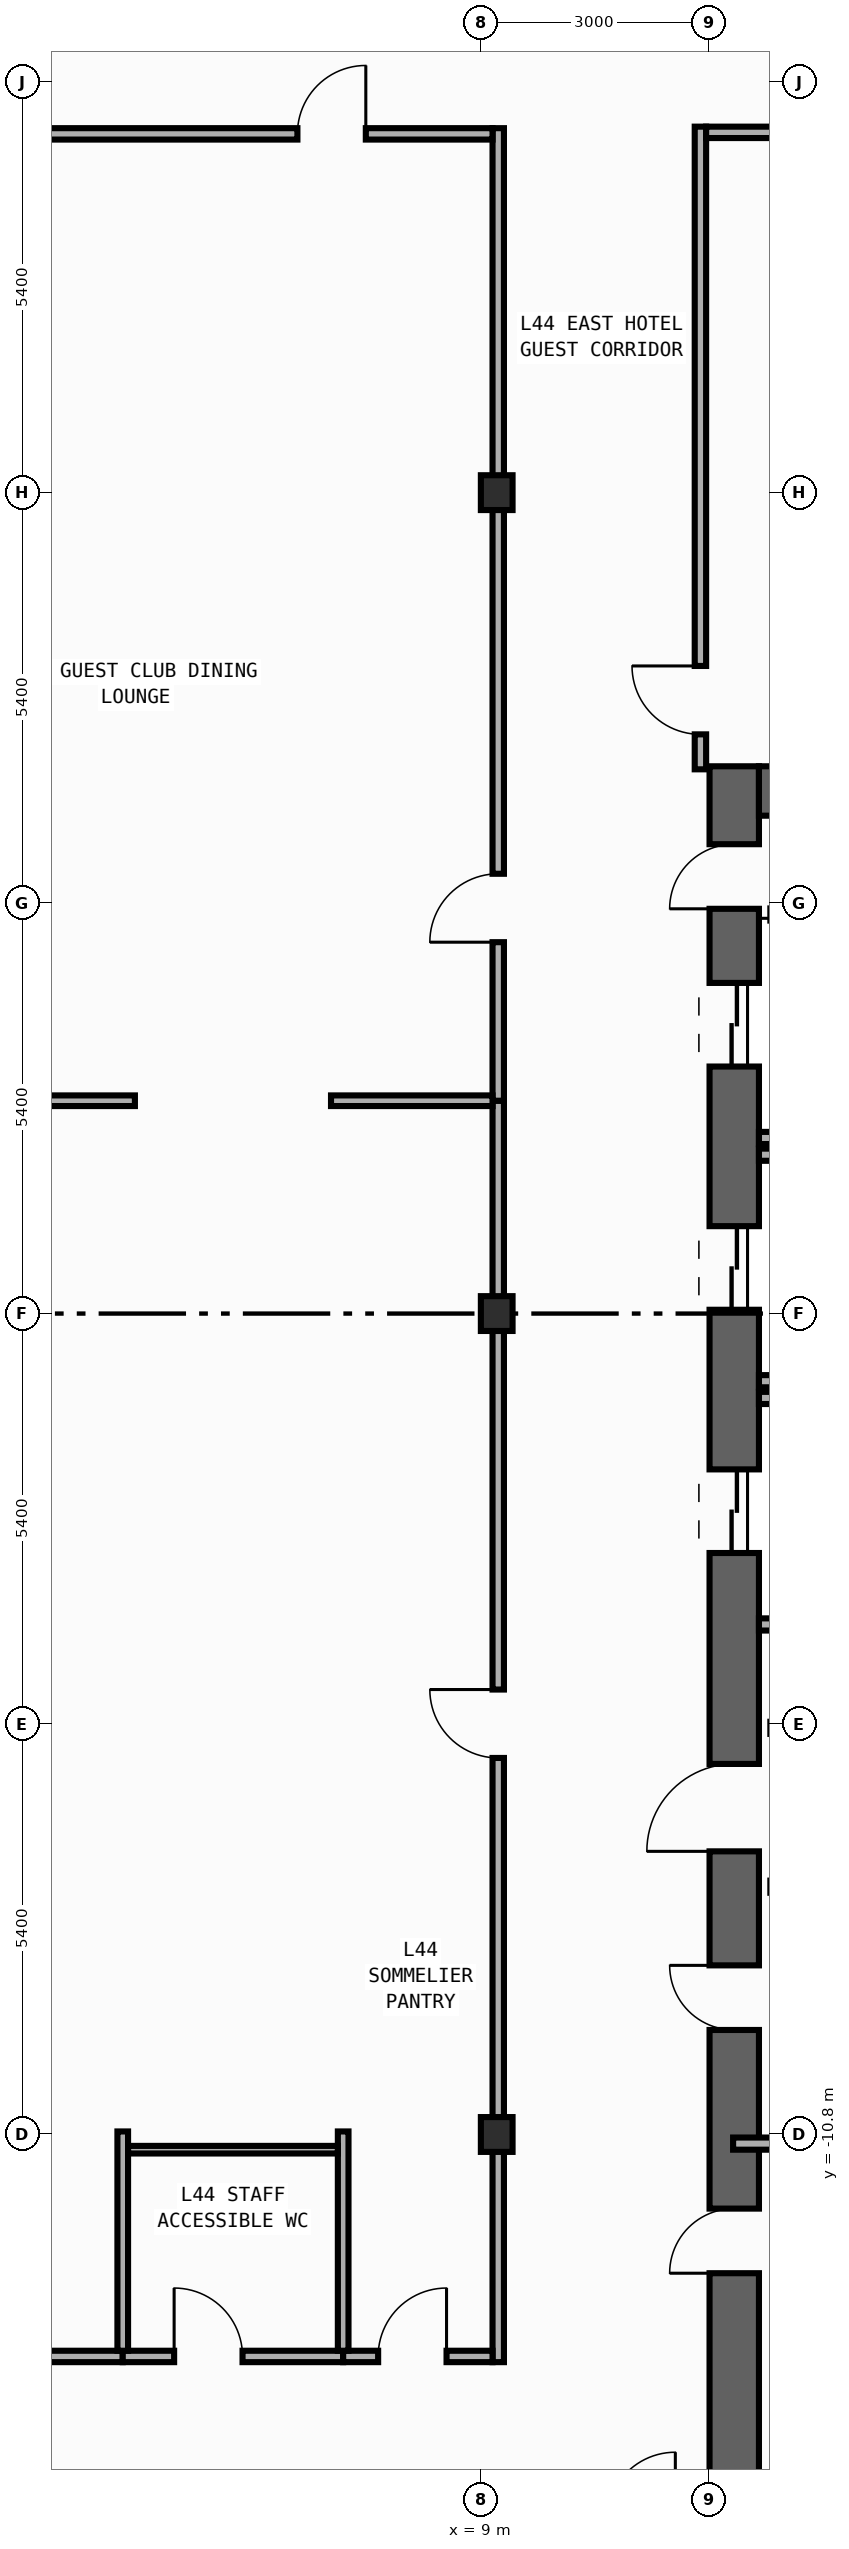
"""IFC4 building model, lengths in metres.
Left out: names, types, materials, properties, quantities, classifications, styles, units other than length and angle.
Written with IfcOpenShell. Run it as: python <this file> out.ifc"""

import sys

from ifc_helpers import new_model, si_unit, direction, frame, frame_2d, origin, origin_2d, place, context, subcontext, project, spatial, rectangle, i_section, extrude, element, fill, save


model = new_model("IFC4")
c1 = context("Model", 3, precision=1e-05, world=origin(), true_north=direction((0.0, 1.0)))
c2 = subcontext(c1, "Body", "Model", "MODEL_VIEW")
j1 = project(units=[si_unit("LENGTHUNIT", "METRE"), si_unit("PLANEANGLEUNIT", "RADIAN")], contexts=[c1])
p1 = place(None, origin())
s1 = spatial("IfcSite", under=j1, at=p1, CompositionType="ELEMENT")
p2 = place(p1, origin())
s2 = spatial("IfcBuilding", under=s1, at=p2, CompositionType="ELEMENT")
p3 = place(p2, frame((0.0, 0.0, 191.6)))
s3 = spatial("IfcBuildingStorey", under=s2, at=p3, CompositionType="ELEMENT", Elevation=191.6)
p4 = place(p3, frame((12.325, -19.8, 0.0), z_axis=(0.0, 0.0, 1.0), x_axis=(0.0, 1.0, 0.0)))
e1 = element("IfcWall", 1, at=p4, inside=s3, PredefinedType="SHEAR", context=c2, shape_type="SweptSolid", body=[
    extrude(rectangle(XDim=27.0, YDim=0.65, at=frame_2d((13.5, 0.0))), origin(), (0.0, 0.0, 1.0), 3.54),
])
p5 = place(p4, frame((23.05, 0.0, 0.0)))
e2 = element("IfcOpeningElement", 2, at=p5, cuts=e1, PredefinedType="OPENING", context=c2, shape_type="SweptSolid", body=[
    extrude(rectangle(XDim=1.1, YDim=2.2, at=frame_2d((0.55, 1.1))), frame((0.0, 0.335, 0.0), z_axis=(0.0, -1.0, 0.0), x_axis=(1.0, 0.0, 0.0)), (0.0, 0.0, 1.0), 0.67),
])
p6 = place(p4, frame((19.85, 0.0, 0.0)))
e3 = element("IfcOpeningElement", 3, at=p6, cuts=e1, PredefinedType="OPENING", context=c2, shape_type="SweptSolid", body=[
    extrude(rectangle(XDim=1.1, YDim=2.2, at=frame_2d((0.55, 1.1))), frame((0.0, 0.335, 0.0), z_axis=(0.0, -1.0, 0.0), x_axis=(1.0, 0.0, 0.0)), (0.0, 0.0, 1.0), 0.67),
])
p7 = place(p4, frame((16.65, 0.0, 0.0)))
e4 = element("IfcOpeningElement", 4, at=p7, cuts=e1, PredefinedType="OPENING", context=c2, shape_type="SweptSolid", body=[
    extrude(rectangle(XDim=1.1, YDim=2.2, at=frame_2d((0.55, 1.1))), frame((0.0, 0.335, 0.0), z_axis=(0.0, -1.0, 0.0), x_axis=(1.0, 0.0, 0.0)), (0.0, 0.0, 1.0), 0.67),
])
p8 = place(p4, frame((7.175, 0.0, 0.0)))
e5 = element("IfcOpeningElement", 5, at=p8, cuts=e1, PredefinedType="OPENING", context=c2, shape_type="SweptSolid", body=[
    extrude(rectangle(XDim=0.85, YDim=2.1, at=frame_2d((0.425, 1.05))), frame((0.0, 0.335, 0.0), z_axis=(0.0, -1.0, 0.0), x_axis=(1.0, 0.0, 0.0)), (0.0, 0.0, 1.0), 0.67),
])
p9 = place(p4, frame((10.375, 0.0, 0.0)))
e6 = element("IfcOpeningElement", 6, at=p9, cuts=e1, PredefinedType="OPENING", context=c2, shape_type="SweptSolid", body=[
    extrude(rectangle(XDim=0.85, YDim=2.1, at=frame_2d((0.425, 1.05))), frame((0.0, 0.335, 0.0), z_axis=(0.0, -1.0, 0.0), x_axis=(1.0, 0.0, 0.0)), (0.0, 0.0, 1.0), 0.67),
])
p10 = place(p4, frame((12.725, 0.0, 0.0)))
e7 = element("IfcOpeningElement", 7, at=p10, cuts=e1, PredefinedType="OPENING", context=c2, shape_type="SweptSolid", body=[
    extrude(rectangle(XDim=1.15, YDim=2.2, at=frame_2d((0.575, 1.1))), frame((0.0, 0.335, 0.0), z_axis=(0.0, -1.0, 0.0), x_axis=(1.0, 0.0, 0.0)), (0.0, 0.0, 1.0), 0.67),
])
p11 = place(p4, frame((25.125, 0.0, 0.0)))
e8 = element("IfcOpeningElement", 8, at=p11, cuts=e1, PredefinedType="OPENING", context=c2, shape_type="SweptSolid", body=[
    extrude(rectangle(XDim=0.85, YDim=2.1, at=frame_2d((0.425, 1.05))), frame((0.0, 0.335, 0.0), z_axis=(0.0, -1.0, 0.0), x_axis=(1.0, 0.0, 0.0)), (0.0, 0.0, 1.0), 0.67),
])
p12 = place(p3, frame((12.65, 6.875, 0.0), z_axis=(0.0, 0.0, 1.0), x_axis=(1.0, 0.0, 0.0)))
e9 = element("IfcWall", 9, at=p12, inside=s3, PredefinedType="SHEAR", context=c2, shape_type="SweptSolid", body=[
    extrude(rectangle(XDim=7.1, YDim=0.65, at=frame_2d((3.55, 0.0))), origin(), (0.0, 0.0, 1.0), 3.54),
])
for number, where, z_axis, x_axis in (
    (10, (9.2, -10.8, 0.0), (0.0, 0.0, 1.0), (1.0, 0.0, 0.0)),
    (11, (9.2, 0.0, 0.0), (0.0, 0.0, 1.0), (1.0, 0.0, 0.0)),
    (12, (9.2, 10.8, 0.0), (0.0, 0.0, 1.0), (1.0, 0.0, 0.0)),
):
    element("IfcColumn", number, at=place(p3, frame(where, z_axis=z_axis, x_axis=x_axis)), inside=s3, PredefinedType="COLUMN", context=c2, shape_type="SweptSolid", body=[
        extrude(i_section(OverallWidth=0.417, OverallDepth=0.458, WebThickness=0.03, FlangeThickness=0.05, FilletRadius=0.022, at=origin_2d()), origin(), (0.0, 0.0, 1.0), 3.8),
    ])
for number, where, z_axis, x_axis in (
    (13, (12.65, 2.31, 0.0), (0.0, 0.0, 1.0), (1.0, 0.0, 0.0)),
    (14, (12.65, -0.89, 0.0), (0.0, 0.0, 1.0), (1.0, 0.0, 0.0)),
    (15, (12.65, 2.09, 0.0), (0.0, 0.0, 1.0), (1.0, 0.0, 0.0)),
    (16, (12.65, -4.09, 0.0), (0.0, 0.0, 1.0), (1.0, 0.0, 0.0)),
    (17, (12.65, -1.11, 0.0), (0.0, 0.0, 1.0), (1.0, 0.0, 0.0)),
):
    element("IfcWall", number, at=place(p3, frame(where, z_axis=z_axis, x_axis=x_axis)), inside=s3, PredefinedType="STANDARD", context=c2, shape_type="SweptSolid", body=[
        extrude(rectangle(XDim=2.34, YDim=0.16, at=frame_2d((1.17, 0.0))), origin(), (0.0, 0.0, 1.0), 3.54),
    ])
for number, where, z_axis, x_axis in (
    (18, (12.8, -5.45, 0.0), (0.0, 0.0, 1.0), (1.0, 0.0, 0.0)),
    (19, (12.8, -7.54, 0.0), (0.0, 0.0, 1.0), (1.0, 0.0, 0.0)),
    (20, (12.8, 5.25, 0.0), (0.0, 0.0, 1.0), (1.0, 0.0, 0.0)),
):
    element("IfcWall", number, at=place(p3, frame(where, z_axis=z_axis, x_axis=x_axis)), inside=s3, PredefinedType="STANDARD", context=c2, shape_type="SweptSolid", body=[
        extrude(rectangle(XDim=2.6, YDim=0.16, at=frame_2d((1.3, 0.0))), origin(), (0.0, 0.0, 1.0), 3.54),
    ])
p13 = place(p3, frame((12.31, -10.92, 0.0), z_axis=(0.0, 0.0, 1.0), x_axis=(1.0, 0.0, 0.0)))
e21 = element("IfcWall", 21, at=p13, inside=s3, PredefinedType="PARTITIONING", context=c2, shape_type="SweptSolid", body=[
    extrude(rectangle(XDim=3.065, YDim=0.16, at=frame_2d((1.532, 0.0))), origin(), (0.0, 0.0, 1.0), 2.952),
])
p14 = place(p3, frame((9.22, -13.795, 0.0), z_axis=(0.0, 0.0, 1.0), x_axis=(0.0, 1.0, 0.0)))
e22 = element("IfcWall", 22, at=p14, inside=s3, PredefinedType="PARTITIONING", context=c2, shape_type="SweptSolid", body=[
    extrude(rectangle(XDim=16.595, YDim=0.15, at=frame_2d((8.297, 0.0))), origin(), (0.0, 0.0, 1.0), 2.952),
])
p15 = place(p14, frame((7.949, 0.0, 0.0)))
e23 = element("IfcOpeningElement", 23, at=p15, cuts=e22, PredefinedType="OPENING", context=c2, shape_type="SweptSolid", body=[
    extrude(rectangle(XDim=0.9, YDim=2.15, at=frame_2d((0.45, 1.075))), frame((0.0, 0.085, 0.0), z_axis=(0.0, -1.0, 0.0), x_axis=(1.0, 0.0, 0.0)), (0.0, 0.0, 1.0), 0.17),
])
p16 = place(p3, frame((9.22, 2.8, 0.0), z_axis=(0.0, 0.0, 1.0), x_axis=(0.0, 1.0, 0.0)))
e24 = element("IfcWall", 24, at=p16, inside=s3, PredefinedType="PARTITIONING", context=c2, shape_type="SweptSolid", body=[
    extrude(rectangle(XDim=12.795, YDim=0.15, at=frame_2d((6.397, 0.0))), origin(), (0.0, 0.0, 1.0), 2.952),
])
p17 = place(p16, frame((2.086, 0.0, 0.0)))
e25 = element("IfcOpeningElement", 25, at=p17, cuts=e24, PredefinedType="OPENING", context=c2, shape_type="SweptSolid", body=[
    extrude(rectangle(XDim=0.9, YDim=2.15, at=frame_2d((0.45, 1.075))), frame((0.0, 0.085, 0.0), z_axis=(0.0, -1.0, 0.0), x_axis=(1.0, 0.0, 0.0)), (0.0, 0.0, 1.0), 0.17),
])
p18 = place(p3, frame((11.88, 7.16, 0.0), z_axis=(0.0, 0.0, 1.0), x_axis=(0.0, 1.0, 0.0)))
e26 = element("IfcWall", 26, at=p18, inside=s3, PredefinedType="PARTITIONING", context=c2, shape_type="SweptSolid", body=[
    extrude(rectangle(XDim=8.455, YDim=0.15, at=frame_2d((4.228, 0.0))), origin(), (0.0, 0.0, 1.0), 3.54),
])
p19 = place(p18, frame((0.46, 0.0, 0.0)))
e27 = element("IfcOpeningElement", 27, at=p19, cuts=e26, PredefinedType="OPENING", context=c2, shape_type="SweptSolid", body=[
    extrude(rectangle(XDim=0.9, YDim=2.15, at=frame_2d((0.45, 1.075))), frame((0.0, 0.085, 0.0), z_axis=(0.0, -1.0, 0.0), x_axis=(1.0, 0.0, 0.0)), (0.0, 0.0, 1.0), 0.17),
])
p20 = place(p3, frame((-0.32, 15.52, 0.0), z_axis=(0.0, 0.0, 1.0), x_axis=(1.0, 0.0, 0.0)))
e28 = element("IfcWall", 28, at=p20, inside=s3, PredefinedType="PARTITIONING", context=c2, shape_type="SweptSolid", body=[
    extrude(rectangle(XDim=9.465, YDim=0.15, at=frame_2d((4.732, 0.0))), origin(), (0.0, 0.0, 1.0), 3.54),
])
p21 = place(p20, frame((6.898, 0.0, 0.0)))
e29 = element("IfcOpeningElement", 29, at=p21, cuts=e28, PredefinedType="OPENING", context=c2, shape_type="SweptSolid", body=[
    extrude(rectangle(XDim=0.9, YDim=2.15, at=frame_2d((0.45, 1.075))), frame((0.0, 0.085, 0.0), z_axis=(0.0, -1.0, 0.0), x_axis=(1.0, 0.0, 0.0)), (0.0, 0.0, 1.0), 0.17),
])
p22 = place(p3, frame((11.955, 15.54, 0.0), z_axis=(0.0, 0.0, 1.0), x_axis=(1.0, 0.0, 0.0)))
e30 = element("IfcWall", 30, at=p22, inside=s3, PredefinedType="PARTITIONING", context=c2, shape_type="SweptSolid", body=[
    extrude(rectangle(XDim=10.5, YDim=0.15, at=frame_2d((5.25, 0.0))), origin(), (0.0, 0.0, 1.0), 3.54),
])
p23 = place(p22, frame((4.901, 0.0, 0.0)))
e31 = element("IfcOpeningElement", 31, at=p23, cuts=e30, PredefinedType="OPENING", context=c2, shape_type="SweptSolid", body=[
    extrude(rectangle(XDim=0.9, YDim=2.15, at=frame_2d((0.45, 1.075))), frame((0.0, 0.085, 0.0), z_axis=(0.0, -1.0, 0.0), x_axis=(1.0, 0.0, 0.0)), (0.0, 0.0, 1.0), 0.17),
])
p24 = place(p3, frame((-3.32, -13.72, 0.0), z_axis=(0.0, 0.0, 1.0), x_axis=(1.0, 0.0, 0.0)))
e32 = element("IfcWall", 32, at=p24, inside=s3, PredefinedType="PARTITIONING", context=c2, shape_type="SweptSolid", body=[
    extrude(rectangle(XDim=7.6, YDim=0.15, at=frame_2d((3.8, 0.0))), origin(), (0.0, 0.0, 1.0), 3.54),
])
p25 = place(p24, frame((0.667, 0.0, 0.0)))
e33 = element("IfcOpeningElement", 33, at=p25, cuts=e32, PredefinedType="OPENING", context=c2, shape_type="SweptSolid", body=[
    extrude(rectangle(XDim=0.9, YDim=2.15, at=frame_2d((0.45, 1.075))), frame((0.0, 0.085, 0.0), z_axis=(0.0, -1.0, 0.0), x_axis=(1.0, 0.0, 0.0)), (0.0, 0.0, 1.0), 0.17),
])
p26 = place(p3, frame((4.28, -13.72, 0.0), z_axis=(0.0, 0.0, 1.0), x_axis=(1.0, 0.0, 0.0)))
e34 = element("IfcWall", 34, at=p26, inside=s3, PredefinedType="PARTITIONING", context=c2, shape_type="SweptSolid", body=[
    extrude(rectangle(XDim=2.9, YDim=0.15, at=frame_2d((1.45, 0.0))), origin(), (0.0, 0.0, 1.0), 3.54),
])
p27 = place(p26, frame((0.676, 0.0, 0.0)))
e35 = element("IfcOpeningElement", 35, at=p27, cuts=e34, PredefinedType="OPENING", context=c2, shape_type="SweptSolid", body=[
    extrude(rectangle(XDim=0.9, YDim=2.15, at=frame_2d((0.45, 1.075))), frame((0.0, 0.085, 0.0), z_axis=(0.0, -1.0, 0.0), x_axis=(1.0, 0.0, 0.0)), (0.0, 0.0, 1.0), 0.17),
])
p28 = place(p3, frame((7.18, -13.72, 0.0), z_axis=(0.0, 0.0, 1.0), x_axis=(1.0, 0.0, 0.0)))
e36 = element("IfcWall", 36, at=p28, inside=s3, PredefinedType="PARTITIONING", context=c2, shape_type="SweptSolid", body=[
    extrude(rectangle(XDim=1.965, YDim=0.15, at=frame_2d((0.982, 0.0))), origin(), (0.0, 0.0, 1.0), 3.54),
])
p29 = place(p28, frame((0.46, 0.0, 0.0)))
e37 = element("IfcOpeningElement", 37, at=p29, cuts=e36, PredefinedType="OPENING", context=c2, shape_type="SweptSolid", body=[
    extrude(rectangle(XDim=0.9, YDim=2.15, at=frame_2d((0.45, 1.075))), frame((0.0, 0.085, 0.0), z_axis=(0.0, -1.0, 0.0), x_axis=(1.0, 0.0, 0.0)), (0.0, 0.0, 1.0), 0.17),
])
p30 = place(p3, frame((4.28, -13.645, 0.0), z_axis=(0.0, 0.0, 1.0), x_axis=(0.0, 1.0, 0.0)))
e38 = element("IfcWall", 38, at=p30, inside=s3, PredefinedType="PARTITIONING", context=c2, shape_type="SweptSolid", body=[
    extrude(rectangle(XDim=2.885, YDim=0.14, at=frame_2d((1.442, 0.0))), origin(), (0.0, 0.0, 1.0), 3.54),
])
p31 = place(p3, frame((-0.32, 2.8, 0.0), z_axis=(0.0, 0.0, 1.0), x_axis=(1.0, 0.0, 0.0)))
e39 = element("IfcWall", 39, at=p31, inside=s3, PredefinedType="PARTITIONING", context=c2, shape_type="SweptSolid", body=[
    extrude(rectangle(XDim=4.76, YDim=0.14, at=frame_2d((2.38, 0.0))), origin(), (0.0, 0.0, 1.0), 3.54),
])
p32 = place(p3, frame((7.18, -13.645, 0.0), z_axis=(0.0, 0.0, 1.0), x_axis=(0.0, 1.0, 0.0)))
e40 = element("IfcWall", 40, at=p32, inside=s3, PredefinedType="PARTITIONING", context=c2, shape_type="SweptSolid", body=[
    extrude(rectangle(XDim=2.885, YDim=0.14, at=frame_2d((1.442, 0.0))), origin(), (0.0, 0.0, 1.0), 3.54),
])
p33 = place(p3, frame((7.02, 2.8, 0.0), z_axis=(0.0, 0.0, 1.0), x_axis=(1.0, 0.0, 0.0)))
e41 = element("IfcWall", 41, at=p33, inside=s3, PredefinedType="PARTITIONING", context=c2, shape_type="SweptSolid", body=[
    extrude(rectangle(XDim=2.125, YDim=0.14, at=frame_2d((1.062, 0.0))), origin(), (0.0, 0.0, 1.0), 3.54),
])
p34 = place(p3, frame((4.35, -11.0, 0.0), z_axis=(0.0, 0.0, 1.0), x_axis=(1.0, 0.0, 0.0)))
e42 = element("IfcWall", 42, at=p34, inside=s3, PredefinedType="PARTITIONING", context=c2, shape_type="SweptSolid", body=[
    extrude(rectangle(XDim=2.76, YDim=0.1, at=frame_2d((1.38, 0.0))), origin(), (0.0, 0.0, 1.0), 2.952),
])
p35 = place(p5, origin())
e43 = element("IfcDoor", 43, at=p35, inside=s3, OperationType="DOUBLE_DOOR_SLIDING", PredefinedType="DOOR", context=c2, shape_type="SweptSolid", body=[
    extrude(rectangle(XDim=1.1, YDim=2.2, at=frame_2d((0.55, 1.1))), frame((0.0, 0.025, 0.0), z_axis=(0.0, -1.0, 0.0), x_axis=(1.0, 0.0, 0.0)), (0.0, 0.0, 1.0), 0.05),
])
fill(e2, e43)
p36 = place(p6, origin())
e44 = element("IfcDoor", 44, at=p36, inside=s3, OperationType="DOUBLE_DOOR_SLIDING", PredefinedType="DOOR", context=c2, shape_type="SweptSolid", body=[
    extrude(rectangle(XDim=1.1, YDim=2.2, at=frame_2d((0.55, 1.1))), frame((0.0, 0.025, 0.0), z_axis=(0.0, -1.0, 0.0), x_axis=(1.0, 0.0, 0.0)), (0.0, 0.0, 1.0), 0.05),
])
fill(e3, e44)
p37 = place(p7, origin())
e45 = element("IfcDoor", 45, at=p37, inside=s3, OperationType="DOUBLE_DOOR_SLIDING", PredefinedType="DOOR", context=c2, shape_type="SweptSolid", body=[
    extrude(rectangle(XDim=1.1, YDim=2.2, at=frame_2d((0.55, 1.1))), frame((0.0, 0.025, 0.0), z_axis=(0.0, -1.0, 0.0), x_axis=(1.0, 0.0, 0.0)), (0.0, 0.0, 1.0), 0.05),
])
fill(e4, e45)
p38 = place(p8, origin())
e46 = element("IfcDoor", 46, at=p38, inside=s3, OperationType="SINGLE_SWING_LEFT", PredefinedType="DOOR", context=c2, shape_type="SweptSolid", body=[
    extrude(rectangle(XDim=0.85, YDim=2.1, at=frame_2d((0.425, 1.05))), frame((0.0, 0.025, 0.0), z_axis=(0.0, -1.0, 0.0), x_axis=(1.0, 0.0, 0.0)), (0.0, 0.0, 1.0), 0.05),
])
fill(e5, e46)
p39 = place(p9, origin())
e47 = element("IfcDoor", 47, at=p39, inside=s3, OperationType="SINGLE_SWING_RIGHT", PredefinedType="DOOR", context=c2, shape_type="SweptSolid", body=[
    extrude(rectangle(XDim=0.85, YDim=2.1, at=frame_2d((0.425, 1.05))), frame((0.0, 0.025, 0.0), z_axis=(0.0, -1.0, 0.0), x_axis=(1.0, 0.0, 0.0)), (0.0, 0.0, 1.0), 0.05),
])
fill(e6, e47)
p40 = place(p10, origin())
e48 = element("IfcDoor", 48, at=p40, inside=s3, OperationType="SINGLE_SWING_LEFT", PredefinedType="DOOR", context=c2, shape_type="SweptSolid", body=[
    extrude(rectangle(XDim=1.15, YDim=2.2, at=frame_2d((0.575, 1.1))), frame((0.0, 0.025, 0.0), z_axis=(0.0, -1.0, 0.0), x_axis=(1.0, 0.0, 0.0)), (0.0, 0.0, 1.0), 0.05),
])
fill(e7, e48)
p41 = place(p11, origin())
e49 = element("IfcDoor", 49, at=p41, inside=s3, OperationType="SINGLE_SWING_LEFT", PredefinedType="DOOR", context=c2, shape_type="SweptSolid", body=[
    extrude(rectangle(XDim=0.85, YDim=2.1, at=frame_2d((0.425, 1.05))), frame((0.0, 0.025, 0.0), z_axis=(0.0, -1.0, 0.0), x_axis=(1.0, 0.0, 0.0)), (0.0, 0.0, 1.0), 0.05),
])
fill(e8, e49)
p42 = place(p15, origin())
e50 = element("IfcDoor", 50, at=p42, inside=s3, OperationType="SINGLE_SWING_RIGHT", PredefinedType="DOOR", context=c2, shape_type="SweptSolid", body=[
    extrude(rectangle(XDim=0.9, YDim=2.15, at=frame_2d((0.45, 1.075))), frame((0.0, 0.025, 0.0), z_axis=(0.0, -1.0, 0.0), x_axis=(1.0, 0.0, 0.0)), (0.0, 0.0, 1.0), 0.05),
])
fill(e23, e50)
p43 = place(p17, origin())
e51 = element("IfcDoor", 51, at=p43, inside=s3, OperationType="SINGLE_SWING_LEFT", PredefinedType="DOOR", context=c2, shape_type="SweptSolid", body=[
    extrude(rectangle(XDim=0.9, YDim=2.15, at=frame_2d((0.45, 1.075))), frame((0.0, 0.025, 0.0), z_axis=(0.0, -1.0, 0.0), x_axis=(1.0, 0.0, 0.0)), (0.0, 0.0, 1.0), 0.05),
])
fill(e25, e51)
p44 = place(p19, origin())
e52 = element("IfcDoor", 52, at=p44, inside=s3, OperationType="SINGLE_SWING_RIGHT", PredefinedType="DOOR", context=c2, shape_type="SweptSolid", body=[
    extrude(rectangle(XDim=0.9, YDim=2.15, at=frame_2d((0.45, 1.075))), frame((0.0, 0.025, 0.0), z_axis=(0.0, -1.0, 0.0), x_axis=(1.0, 0.0, 0.0)), (0.0, 0.0, 1.0), 0.05),
])
fill(e27, e52)
p45 = place(p21, origin())
e53 = element("IfcDoor", 53, at=p45, inside=s3, OperationType="SINGLE_SWING_RIGHT", PredefinedType="DOOR", context=c2, shape_type="SweptSolid", body=[
    extrude(rectangle(XDim=0.9, YDim=2.15, at=frame_2d((0.45, 1.075))), frame((0.0, 0.025, 0.0), z_axis=(0.0, -1.0, 0.0), x_axis=(1.0, 0.0, 0.0)), (0.0, 0.0, 1.0), 0.05),
])
fill(e29, e53)
p46 = place(p27, origin())
e54 = element("IfcDoor", 54, at=p46, inside=s3, OperationType="SINGLE_SWING_LEFT", PredefinedType="DOOR", context=c2, shape_type="SweptSolid", body=[
    extrude(rectangle(XDim=0.9, YDim=2.15, at=frame_2d((0.45, 1.075))), frame((0.0, 0.025, 0.0), z_axis=(0.0, -1.0, 0.0), x_axis=(1.0, 0.0, 0.0)), (0.0, 0.0, 1.0), 0.05),
])
fill(e35, e54)
p47 = place(p29, origin())
e55 = element("IfcDoor", 55, at=p47, inside=s3, OperationType="SINGLE_SWING_RIGHT", PredefinedType="DOOR", context=c2, shape_type="SweptSolid", body=[
    extrude(rectangle(XDim=0.9, YDim=2.15, at=frame_2d((0.45, 1.075))), frame((0.0, 0.025, 0.0), z_axis=(0.0, -1.0, 0.0), x_axis=(1.0, 0.0, 0.0)), (0.0, 0.0, 1.0), 0.05),
])
fill(e37, e55)
save(model, sys.argv[1])
